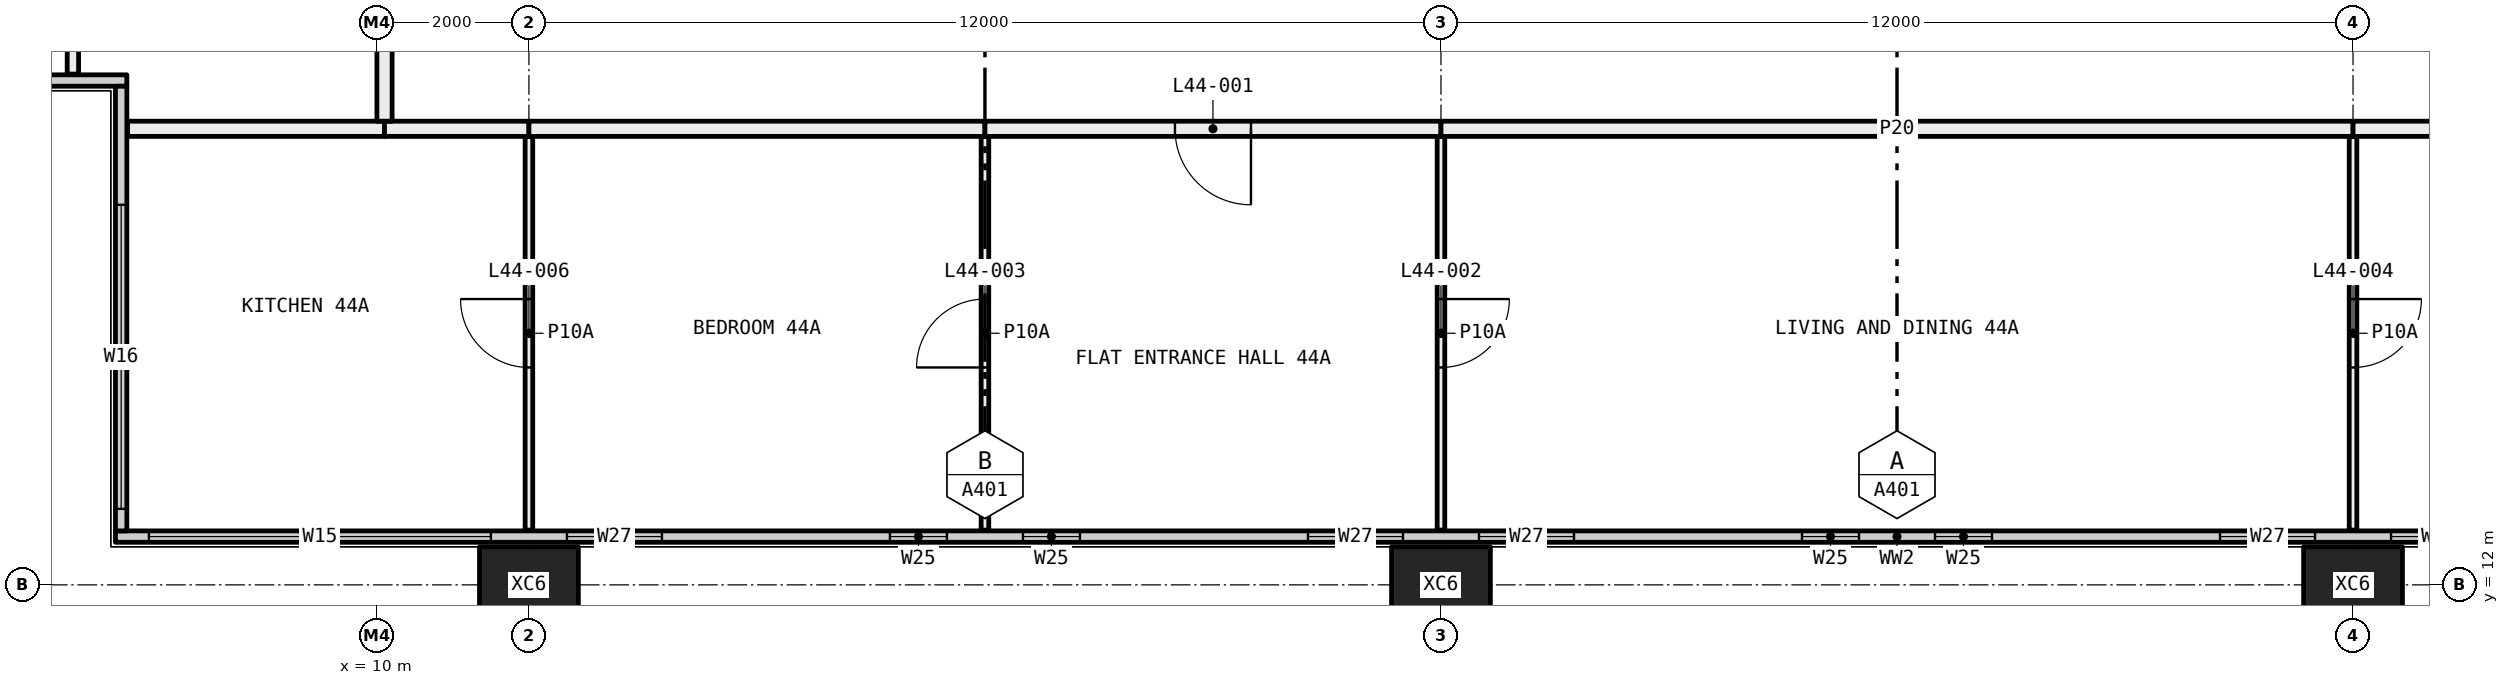
"""IFC4 building model, lengths in metres.
Left out: names, types, materials, properties, quantities, classifications, styles, units other than length and angle.
Written with IfcOpenShell. Run it as: python <this file> out.ifc"""

import sys

from ifc_helpers import new_model, si_unit, direction, frame, frame_2d, origin, origin_2d, place, context, subcontext, project, spatial, rectangle, hollow_rectangle, extrude, element, fill, save


model = new_model("IFC4")
c1 = context("Model", 3, precision=1e-05, world=origin(), true_north=direction((0.0, 1.0)))
c2 = subcontext(c1, "Body", "Model", "MODEL_VIEW")
j1 = project(units=[si_unit("LENGTHUNIT", "METRE"), si_unit("PLANEANGLEUNIT", "RADIAN")], contexts=[c1])
p1 = place(None, origin())
s1 = spatial("IfcSite", under=j1, at=p1, CompositionType="ELEMENT")
p2 = place(p1, origin())
s2 = spatial("IfcBuilding", under=s1, at=p2, CompositionType="ELEMENT")
p3 = place(p2, frame((0.0, 0.0, 168.6)))
s3 = spatial("IfcBuildingStorey", under=s2, at=p3, CompositionType="ELEMENT", Elevation=168.6)
for number, where, z_axis, x_axis in (
    (1, (12.0, 12.0, -0.4), (0.0, 0.0, 1.0), (1.0, 0.0, 0.0)),
    (2, (24.0, 12.0, -0.4), (0.0, 0.0, 1.0), (1.0, 0.0, 0.0)),
    (3, (36.0, 12.0, -0.4), (0.0, 0.0, 1.0), (1.0, 0.0, 0.0)),
):
    element("IfcColumn", number, at=place(p3, frame(where, z_axis=z_axis, x_axis=x_axis)), inside=s3, PredefinedType="COLUMN", context=c2, shape_type="SweptSolid", body=[
        extrude(hollow_rectangle(XDim=1.3, YDim=1.0, WallThickness=0.05, at=origin_2d()), origin(), (0.0, 0.0, 1.0), 3.45),
    ])
p4 = place(p3, frame((6.56, 12.635, 0.0), z_axis=(0.0, 0.0, 1.0), x_axis=(1.0, 0.0, 0.0)))
e4 = element("IfcWall", 4, at=p4, inside=s3, PredefinedType="ELEMENTEDWALL", context=c2, shape_type="SweptSolid", body=[
    extrude(rectangle(XDim=46.88, YDim=0.15, at=frame_2d((23.44, 0.0))), origin(), (0.0, 0.0, 1.0), 3.05),
])
p5 = place(p4, frame((0.44, 0.0, 0.45)))
e5 = element("IfcOpeningElement", 5, at=p5, cuts=e4, PredefinedType="OPENING", context=c2, shape_type="SweptSolid", body=[
    extrude(rectangle(XDim=4.5, YDim=2.55, at=frame_2d((2.25, 1.275))), frame((0.0, 0.085, 0.0), z_axis=(0.0, -1.0, 0.0), x_axis=(1.0, 0.0, 0.0)), (0.0, 0.0, 1.0), 0.17),
])
p6 = place(p4, frame((5.94, 0.0, 0.45)))
e6 = element("IfcOpeningElement", 6, at=p6, cuts=e4, PredefinedType="OPENING", context=c2, shape_type="SweptSolid", body=[
    extrude(rectangle(XDim=1.25, YDim=2.55, at=frame_2d((0.625, 1.275))), frame((0.0, 0.085, 0.0), z_axis=(0.0, -1.0, 0.0), x_axis=(1.0, 0.0, 0.0)), (0.0, 0.0, 1.0), 0.17),
])
p7 = place(p4, frame((10.19, 0.0, 0.45)))
e7 = element("IfcOpeningElement", 7, at=p7, cuts=e4, PredefinedType="OPENING", context=c2, shape_type="SweptSolid", body=[
    extrude(rectangle(XDim=0.75, YDim=2.55, at=frame_2d((0.375, 1.275))), frame((0.0, 0.085, 0.0), z_axis=(0.0, -1.0, 0.0), x_axis=(1.0, 0.0, 0.0)), (0.0, 0.0, 1.0), 0.17),
])
p8 = place(p4, frame((11.94, 0.0, 0.45)))
e8 = element("IfcOpeningElement", 8, at=p8, cuts=e4, PredefinedType="OPENING", context=c2, shape_type="SweptSolid", body=[
    extrude(rectangle(XDim=0.75, YDim=2.55, at=frame_2d((0.375, 1.275))), frame((0.0, 0.085, 0.0), z_axis=(0.0, -1.0, 0.0), x_axis=(1.0, 0.0, 0.0)), (0.0, 0.0, 1.0), 0.17),
])
p9 = place(p4, frame((15.69, 0.0, 0.45)))
e9 = element("IfcOpeningElement", 9, at=p9, cuts=e4, PredefinedType="OPENING", context=c2, shape_type="SweptSolid", body=[
    extrude(rectangle(XDim=1.25, YDim=2.55, at=frame_2d((0.625, 1.275))), frame((0.0, 0.085, 0.0), z_axis=(0.0, -1.0, 0.0), x_axis=(1.0, 0.0, 0.0)), (0.0, 0.0, 1.0), 0.17),
])
p10 = place(p4, frame((17.94, 0.0, 0.45)))
e10 = element("IfcOpeningElement", 10, at=p10, cuts=e4, PredefinedType="OPENING", context=c2, shape_type="SweptSolid", body=[
    extrude(rectangle(XDim=1.25, YDim=2.55, at=frame_2d((0.625, 1.275))), frame((0.0, 0.085, 0.0), z_axis=(0.0, -1.0, 0.0), x_axis=(1.0, 0.0, 0.0)), (0.0, 0.0, 1.0), 0.17),
])
p11 = place(p4, frame((22.19, 0.0, 0.45)))
e11 = element("IfcOpeningElement", 11, at=p11, cuts=e4, PredefinedType="OPENING", context=c2, shape_type="SweptSolid", body=[
    extrude(rectangle(XDim=0.75, YDim=2.55, at=frame_2d((0.375, 1.275))), frame((0.0, 0.085, 0.0), z_axis=(0.0, -1.0, 0.0), x_axis=(1.0, 0.0, 0.0)), (0.0, 0.0, 1.0), 0.17),
])
p12 = place(p4, frame((23.94, 0.0, 0.45)))
e12 = element("IfcOpeningElement", 12, at=p12, cuts=e4, PredefinedType="OPENING", context=c2, shape_type="SweptSolid", body=[
    extrude(rectangle(XDim=0.75, YDim=2.55, at=frame_2d((0.375, 1.275))), frame((0.0, 0.085, 0.0), z_axis=(0.0, -1.0, 0.0), x_axis=(1.0, 0.0, 0.0)), (0.0, 0.0, 1.0), 0.17),
])
p13 = place(p4, frame((27.69, 0.0, 0.45)))
e13 = element("IfcOpeningElement", 13, at=p13, cuts=e4, PredefinedType="OPENING", context=c2, shape_type="SweptSolid", body=[
    extrude(rectangle(XDim=1.25, YDim=2.55, at=frame_2d((0.625, 1.275))), frame((0.0, 0.085, 0.0), z_axis=(0.0, -1.0, 0.0), x_axis=(1.0, 0.0, 0.0)), (0.0, 0.0, 1.0), 0.17),
])
p14 = place(p4, frame((29.94, 0.0, 0.45)))
e14 = element("IfcOpeningElement", 14, at=p14, cuts=e4, PredefinedType="OPENING", context=c2, shape_type="SweptSolid", body=[
    extrude(rectangle(XDim=1.25, YDim=2.55, at=frame_2d((0.625, 1.275))), frame((0.0, 0.085, 0.0), z_axis=(0.0, -1.0, 0.0), x_axis=(1.0, 0.0, 0.0)), (0.0, 0.0, 1.0), 0.17),
])
p15 = place(p4, frame((34.19, 0.0, 0.45)))
e15 = element("IfcOpeningElement", 15, at=p15, cuts=e4, PredefinedType="OPENING", context=c2, shape_type="SweptSolid", body=[
    extrude(rectangle(XDim=0.75, YDim=2.55, at=frame_2d((0.375, 1.275))), frame((0.0, 0.085, 0.0), z_axis=(0.0, -1.0, 0.0), x_axis=(1.0, 0.0, 0.0)), (0.0, 0.0, 1.0), 0.17),
])
p16 = place(p4, frame((35.94, 0.0, 0.45)))
e16 = element("IfcOpeningElement", 16, at=p16, cuts=e4, PredefinedType="OPENING", context=c2, shape_type="SweptSolid", body=[
    extrude(rectangle(XDim=0.75, YDim=2.55, at=frame_2d((0.375, 1.275))), frame((0.0, 0.085, 0.0), z_axis=(0.0, -1.0, 0.0), x_axis=(1.0, 0.0, 0.0)), (0.0, 0.0, 1.0), 0.17),
])
p17 = place(p4, frame((39.69, 0.0, 0.45)))
e17 = element("IfcOpeningElement", 17, at=p17, cuts=e4, PredefinedType="OPENING", context=c2, shape_type="SweptSolid", body=[
    extrude(rectangle(XDim=1.25, YDim=2.55, at=frame_2d((0.625, 1.275))), frame((0.0, 0.085, 0.0), z_axis=(0.0, -1.0, 0.0), x_axis=(1.0, 0.0, 0.0)), (0.0, 0.0, 1.0), 0.17),
])
p18 = place(p4, frame((41.94, 0.0, 0.45)))
e18 = element("IfcOpeningElement", 18, at=p18, cuts=e4, PredefinedType="OPENING", context=c2, shape_type="SweptSolid", body=[
    extrude(rectangle(XDim=4.5, YDim=2.55, at=frame_2d((2.25, 1.275))), frame((0.0, 0.085, 0.0), z_axis=(0.0, -1.0, 0.0), x_axis=(1.0, 0.0, 0.0)), (0.0, 0.0, 1.0), 0.17),
])
p19 = place(p3, frame((0.56, 18.635, 0.0), z_axis=(0.0, 0.0, 1.0), x_axis=(1.0, 0.0, 0.0)))
e19 = element("IfcWall", 19, at=p19, inside=s3, PredefinedType="ELEMENTEDWALL", context=c2, shape_type="SweptSolid", body=[
    extrude(rectangle(XDim=6.15, YDim=0.15, at=frame_2d((3.075, 0.0))), origin(), (0.0, 0.0, 1.0), 3.05),
])
p20 = place(p19, frame((0.44, 0.0, 0.45)))
e20 = element("IfcOpeningElement", 20, at=p20, cuts=e19, PredefinedType="OPENING", context=c2, shape_type="SweptSolid", body=[
    extrude(rectangle(XDim=4.0, YDim=2.55, at=frame_2d((2.0, 1.275))), frame((0.0, 0.085, 0.0), z_axis=(0.0, -1.0, 0.0), x_axis=(1.0, 0.0, 0.0)), (0.0, 0.0, 1.0), 0.17),
])
p21 = place(p3, frame((6.635, 12.71, 0.0), z_axis=(0.0, 0.0, 1.0), x_axis=(0.0, 1.0, 0.0)))
e21 = element("IfcWall", 21, at=p21, inside=s3, PredefinedType="ELEMENTEDWALL", context=c2, shape_type="SweptSolid", body=[
    extrude(rectangle(XDim=5.85, YDim=0.15, at=frame_2d((2.925, 0.0))), origin(), (0.0, 0.0, 1.0), 3.05),
])
p22 = place(p21, frame((0.29, 0.0, 0.45)))
e22 = element("IfcOpeningElement", 22, at=p22, cuts=e21, PredefinedType="OPENING", context=c2, shape_type="SweptSolid", body=[
    extrude(rectangle(XDim=4.0, YDim=2.55, at=frame_2d((2.0, 1.275))), frame((0.0, 0.085, 0.0), z_axis=(0.0, -1.0, 0.0), x_axis=(1.0, 0.0, 0.0)), (0.0, 0.0, 1.0), 0.17),
])
p23 = place(p3, frame((12.0, 12.72, 0.0), z_axis=(0.0, 0.0, 1.0), x_axis=(0.0, 1.0, 0.0)))
e23 = element("IfcWall", 23, at=p23, inside=s3, PredefinedType="PARTITIONING", context=c2, shape_type="SweptSolid", body=[
    extrude(rectangle(XDim=5.18, YDim=0.1, at=frame_2d((2.59, 0.0))), origin(), (0.0, 0.0, 1.0), 3.05),
])
p24 = place(p23, frame((2.14, 0.0, 0.0)))
e24 = element("IfcOpeningElement", 24, at=p24, cuts=e23, PredefinedType="OPENING", context=c2, shape_type="SweptSolid", body=[
    extrude(rectangle(XDim=0.9, YDim=2.1, at=frame_2d((0.45, 1.05))), frame((0.0, 0.06, 0.0), z_axis=(0.0, -1.0, 0.0), x_axis=(1.0, 0.0, 0.0)), (0.0, 0.0, 1.0), 0.12),
])
p25 = place(p3, frame((10.1, 18.0, 0.0), z_axis=(0.0, 0.0, 1.0), x_axis=(-1.0, 0.0, 0.0)))
e25 = element("IfcWall", 25, at=p25, inside=s3, PredefinedType="PARTITIONING", context=c2, shape_type="SweptSolid", body=[
    extrude(rectangle(XDim=3.38, YDim=0.2, at=frame_2d((1.69, 0.0))), origin(), (0.0, 0.0, 1.0), 3.05),
])
p26 = place(p3, frame((12.0, 18.0, 0.0), z_axis=(0.0, 0.0, 1.0), x_axis=(-1.0, 0.0, 0.0)))
e26 = element("IfcWall", 26, at=p26, inside=s3, PredefinedType="PARTITIONING", context=c2, shape_type="SweptSolid", body=[
    extrude(rectangle(XDim=1.9, YDim=0.2, at=frame_2d((0.95, 0.0))), origin(), (0.0, 0.0, 1.0), 3.05),
])
p27 = place(p3, frame((18.0, 12.72, 0.0), z_axis=(0.0, 0.0, 1.0), x_axis=(0.0, 1.0, 0.0)))
e27 = element("IfcWall", 27, at=p27, inside=s3, PredefinedType="PARTITIONING", context=c2, shape_type="SweptSolid", body=[
    extrude(rectangle(XDim=5.18, YDim=0.1, at=frame_2d((2.59, 0.0))), origin(), (0.0, 0.0, 1.0), 3.05),
])
p28 = place(p27, frame((2.14, 0.0, 0.0)))
e28 = element("IfcOpeningElement", 28, at=p28, cuts=e27, PredefinedType="OPENING", context=c2, shape_type="SweptSolid", body=[
    extrude(rectangle(XDim=0.9, YDim=2.1, at=frame_2d((0.45, 1.05))), frame((0.0, 0.06, 0.0), z_axis=(0.0, -1.0, 0.0), x_axis=(1.0, 0.0, 0.0)), (0.0, 0.0, 1.0), 0.12),
])
p29 = place(p3, frame((18.0, 18.0, 0.0), z_axis=(0.0, 0.0, 1.0), x_axis=(-1.0, 0.0, 0.0)))
e29 = element("IfcWall", 29, at=p29, inside=s3, PredefinedType="PARTITIONING", context=c2, shape_type="SweptSolid", body=[
    extrude(rectangle(XDim=6.0, YDim=0.2, at=frame_2d((3.0, 0.0))), origin(), (0.0, 0.0, 1.0), 3.05),
])
p30 = place(p3, frame((24.0, 12.72, 0.0), z_axis=(0.0, 0.0, 1.0), x_axis=(0.0, 1.0, 0.0)))
e30 = element("IfcWall", 30, at=p30, inside=s3, PredefinedType="PARTITIONING", context=c2, shape_type="SweptSolid", body=[
    extrude(rectangle(XDim=5.18, YDim=0.1, at=frame_2d((2.59, 0.0))), origin(), (0.0, 0.0, 1.0), 3.05),
])
p31 = place(p30, frame((2.14, 0.0, 0.0)))
e31 = element("IfcOpeningElement", 31, at=p31, cuts=e30, PredefinedType="OPENING", context=c2, shape_type="SweptSolid", body=[
    extrude(rectangle(XDim=0.9, YDim=2.1, at=frame_2d((0.45, 1.05))), frame((0.0, 0.06, 0.0), z_axis=(0.0, -1.0, 0.0), x_axis=(1.0, 0.0, 0.0)), (0.0, 0.0, 1.0), 0.12),
])
p32 = place(p3, frame((24.0, 18.0, 0.0), z_axis=(0.0, 0.0, 1.0), x_axis=(-1.0, 0.0, 0.0)))
e32 = element("IfcWall", 32, at=p32, inside=s3, PredefinedType="PARTITIONING", context=c2, shape_type="SweptSolid", body=[
    extrude(rectangle(XDim=6.0, YDim=0.2, at=frame_2d((3.0, 0.0))), origin(), (0.0, 0.0, 1.0), 3.05),
])
p33 = place(p32, frame((2.5, 0.0, 0.0)))
e33 = element("IfcOpeningElement", 33, at=p33, cuts=e32, PredefinedType="OPENING", context=c2, shape_type="SweptSolid", body=[
    extrude(rectangle(XDim=1.0, YDim=2.1, at=frame_2d((0.5, 1.05))), frame((0.0, 0.11, 0.0), z_axis=(0.0, -1.0, 0.0), x_axis=(1.0, 0.0, 0.0)), (0.0, 0.0, 1.0), 0.22),
])
p34 = place(p3, frame((36.0, 12.72, 0.0), z_axis=(0.0, 0.0, 1.0), x_axis=(0.0, 1.0, 0.0)))
e34 = element("IfcWall", 34, at=p34, inside=s3, PredefinedType="PARTITIONING", context=c2, shape_type="SweptSolid", body=[
    extrude(rectangle(XDim=5.18, YDim=0.1, at=frame_2d((2.59, 0.0))), origin(), (0.0, 0.0, 1.0), 2.45),
])
p35 = place(p34, frame((2.14, 0.0, 0.0)))
e35 = element("IfcOpeningElement", 35, at=p35, cuts=e34, PredefinedType="OPENING", context=c2, shape_type="SweptSolid", body=[
    extrude(rectangle(XDim=0.9, YDim=2.1, at=frame_2d((0.45, 1.05))), frame((0.0, 0.06, 0.0), z_axis=(0.0, -1.0, 0.0), x_axis=(1.0, 0.0, 0.0)), (0.0, 0.0, 1.0), 0.12),
])
p36 = place(p3, frame((36.0, 18.0, 0.0), z_axis=(0.0, 0.0, 1.0), x_axis=(-1.0, 0.0, 0.0)))
e36 = element("IfcWall", 36, at=p36, inside=s3, PredefinedType="PARTITIONING", context=c2, shape_type="SweptSolid", body=[
    extrude(rectangle(XDim=12.0, YDim=0.2, at=frame_2d((6.0, 0.0))), origin(), (0.0, 0.0, 1.0), 2.45),
])
p37 = place(p3, frame((42.0, 18.0, 0.0), z_axis=(0.0, 0.0, 1.0), x_axis=(-1.0, 0.0, 0.0)))
e37 = element("IfcWall", 37, at=p37, inside=s3, PredefinedType="PARTITIONING", context=c2, shape_type="SweptSolid", body=[
    extrude(rectangle(XDim=6.0, YDim=0.2, at=frame_2d((3.0, 0.0))), origin(), (0.0, 0.0, 1.0), 2.45),
])
p38 = place(p3, frame((6.0, 18.72, 0.0), z_axis=(0.0, 0.0, 1.0), x_axis=(0.0, 1.0, 0.0)))
e38 = element("IfcWall", 38, at=p38, inside=s3, PredefinedType="PARTITIONING", context=c2, shape_type="SweptSolid", body=[
    extrude(rectangle(XDim=3.78, YDim=0.15, at=frame_2d((1.89, 0.0))), origin(), (0.0, 0.0, 1.0), 3.05),
])
p39 = place(p3, frame((10.1, 18.1, 0.0), z_axis=(0.0, 0.0, 1.0), x_axis=(0.0, 1.0, 0.0)))
e39 = element("IfcWall", 39, at=p39, inside=s3, PredefinedType="PARTITIONING", context=c2, shape_type="SweptSolid", body=[
    extrude(rectangle(XDim=4.4, YDim=0.2, at=frame_2d((2.2, 0.0))), origin(), (0.0, 0.0, 1.0), 3.05),
])
p40 = place(p5, origin())
e40 = element("IfcWindow", 40, at=p40, inside=s3, PartitioningType="SINGLE_PANEL", PredefinedType="WINDOW", context=c2, shape_type="SweptSolid", body=[
    extrude(rectangle(XDim=4.5, YDim=2.55, at=frame_2d((2.25, 1.275))), frame((0.0, 0.03, 0.0), z_axis=(0.0, -1.0, 0.0), x_axis=(1.0, 0.0, 0.0)), (0.0, 0.0, 1.0), 0.06),
])
fill(e5, e40)
p41 = place(p6, origin())
e41 = element("IfcWindow", 41, at=p41, inside=s3, PartitioningType="SINGLE_PANEL", PredefinedType="WINDOW", context=c2, shape_type="SweptSolid", body=[
    extrude(rectangle(XDim=1.25, YDim=2.55, at=frame_2d((0.625, 1.275))), frame((0.0, 0.03, 0.0), z_axis=(0.0, -1.0, 0.0), x_axis=(1.0, 0.0, 0.0)), (0.0, 0.0, 1.0), 0.06),
])
fill(e6, e41)
p42 = place(p7, origin())
e42 = element("IfcWindow", 42, at=p42, inside=s3, PartitioningType="SINGLE_PANEL", PredefinedType="WINDOW", context=c2, shape_type="SweptSolid", body=[
    extrude(rectangle(XDim=0.75, YDim=2.55, at=frame_2d((0.375, 1.275))), frame((0.0, 0.03, 0.0), z_axis=(0.0, -1.0, 0.0), x_axis=(1.0, 0.0, 0.0)), (0.0, 0.0, 1.0), 0.06),
])
fill(e7, e42)
p43 = place(p8, origin())
e43 = element("IfcWindow", 43, at=p43, inside=s3, PartitioningType="SINGLE_PANEL", PredefinedType="WINDOW", context=c2, shape_type="SweptSolid", body=[
    extrude(rectangle(XDim=0.75, YDim=2.55, at=frame_2d((0.375, 1.275))), frame((0.0, 0.03, 0.0), z_axis=(0.0, -1.0, 0.0), x_axis=(1.0, 0.0, 0.0)), (0.0, 0.0, 1.0), 0.06),
])
fill(e8, e43)
p44 = place(p9, origin())
e44 = element("IfcWindow", 44, at=p44, inside=s3, PartitioningType="SINGLE_PANEL", PredefinedType="WINDOW", context=c2, shape_type="SweptSolid", body=[
    extrude(rectangle(XDim=1.25, YDim=2.55, at=frame_2d((0.625, 1.275))), frame((0.0, 0.03, 0.0), z_axis=(0.0, -1.0, 0.0), x_axis=(1.0, 0.0, 0.0)), (0.0, 0.0, 1.0), 0.06),
])
fill(e9, e44)
p45 = place(p10, origin())
e45 = element("IfcWindow", 45, at=p45, inside=s3, PartitioningType="SINGLE_PANEL", PredefinedType="WINDOW", context=c2, shape_type="SweptSolid", body=[
    extrude(rectangle(XDim=1.25, YDim=2.55, at=frame_2d((0.625, 1.275))), frame((0.0, 0.03, 0.0), z_axis=(0.0, -1.0, 0.0), x_axis=(1.0, 0.0, 0.0)), (0.0, 0.0, 1.0), 0.06),
])
fill(e10, e45)
p46 = place(p11, origin())
e46 = element("IfcWindow", 46, at=p46, inside=s3, PartitioningType="SINGLE_PANEL", PredefinedType="WINDOW", context=c2, shape_type="SweptSolid", body=[
    extrude(rectangle(XDim=0.75, YDim=2.55, at=frame_2d((0.375, 1.275))), frame((0.0, 0.03, 0.0), z_axis=(0.0, -1.0, 0.0), x_axis=(1.0, 0.0, 0.0)), (0.0, 0.0, 1.0), 0.06),
])
fill(e11, e46)
p47 = place(p12, origin())
e47 = element("IfcWindow", 47, at=p47, inside=s3, PartitioningType="SINGLE_PANEL", PredefinedType="WINDOW", context=c2, shape_type="SweptSolid", body=[
    extrude(rectangle(XDim=0.75, YDim=2.55, at=frame_2d((0.375, 1.275))), frame((0.0, 0.03, 0.0), z_axis=(0.0, -1.0, 0.0), x_axis=(1.0, 0.0, 0.0)), (0.0, 0.0, 1.0), 0.06),
])
fill(e12, e47)
p48 = place(p13, origin())
e48 = element("IfcWindow", 48, at=p48, inside=s3, PartitioningType="SINGLE_PANEL", PredefinedType="WINDOW", context=c2, shape_type="SweptSolid", body=[
    extrude(rectangle(XDim=1.25, YDim=2.55, at=frame_2d((0.625, 1.275))), frame((0.0, 0.03, 0.0), z_axis=(0.0, -1.0, 0.0), x_axis=(1.0, 0.0, 0.0)), (0.0, 0.0, 1.0), 0.06),
])
fill(e13, e48)
p49 = place(p14, origin())
e49 = element("IfcWindow", 49, at=p49, inside=s3, PartitioningType="SINGLE_PANEL", PredefinedType="WINDOW", context=c2, shape_type="SweptSolid", body=[
    extrude(rectangle(XDim=1.25, YDim=2.55, at=frame_2d((0.625, 1.275))), frame((0.0, 0.03, 0.0), z_axis=(0.0, -1.0, 0.0), x_axis=(1.0, 0.0, 0.0)), (0.0, 0.0, 1.0), 0.06),
])
fill(e14, e49)
p50 = place(p22, origin())
e50 = element("IfcWindow", 50, at=p50, inside=s3, PartitioningType="SINGLE_PANEL", PredefinedType="WINDOW", context=c2, shape_type="SweptSolid", body=[
    extrude(rectangle(XDim=4.0, YDim=2.55, at=frame_2d((2.0, 1.275))), frame((0.0, 0.03, 0.0), z_axis=(0.0, -1.0, 0.0), x_axis=(1.0, 0.0, 0.0)), (0.0, 0.0, 1.0), 0.06),
])
fill(e22, e50)
p51 = place(p33, origin())
e51 = element("IfcDoor", 51, at=p51, inside=s3, OperationType="SINGLE_SWING_RIGHT", PredefinedType="DOOR", context=c2, shape_type="SweptSolid", body=[
    extrude(rectangle(XDim=1.0, YDim=2.1, at=frame_2d((0.5, 1.05))), frame((0.0, 0.025, 0.0), z_axis=(0.0, -1.0, 0.0), x_axis=(1.0, 0.0, 0.0)), (0.0, 0.0, 1.0), 0.05),
])
fill(e33, e51)
p52 = place(p31, frame((0.9, 0.0, 0.0), x_axis=(-1.0, 0.0, 0.0)))
e52 = element("IfcDoor", 52, at=p52, inside=s3, OperationType="SINGLE_SWING_RIGHT", PredefinedType="DOOR", context=c2, shape_type="SweptSolid", body=[
    extrude(rectangle(XDim=0.9, YDim=2.1, at=frame_2d((0.45, 1.05))), frame((0.0, 0.025, 0.0), z_axis=(0.0, -1.0, 0.0), x_axis=(1.0, 0.0, 0.0)), (0.0, 0.0, 1.0), 0.05),
])
fill(e31, e52)
p53 = place(p28, origin())
e53 = element("IfcDoor", 53, at=p53, inside=s3, OperationType="SINGLE_SWING_RIGHT", PredefinedType="DOOR", context=c2, shape_type="SweptSolid", body=[
    extrude(rectangle(XDim=0.9, YDim=2.1, at=frame_2d((0.45, 1.05))), frame((0.0, 0.025, 0.0), z_axis=(0.0, -1.0, 0.0), x_axis=(1.0, 0.0, 0.0)), (0.0, 0.0, 1.0), 0.05),
])
fill(e28, e53)
p54 = place(p35, frame((0.9, 0.0, 0.0), x_axis=(-1.0, 0.0, 0.0)))
e54 = element("IfcDoor", 54, at=p54, inside=s3, OperationType="SINGLE_SWING_RIGHT", PredefinedType="DOOR", context=c2, shape_type="SweptSolid", body=[
    extrude(rectangle(XDim=0.9, YDim=2.1, at=frame_2d((0.45, 1.05))), frame((0.0, 0.025, 0.0), z_axis=(0.0, -1.0, 0.0), x_axis=(1.0, 0.0, 0.0)), (0.0, 0.0, 1.0), 0.05),
])
fill(e35, e54)
p55 = place(p24, origin())
e55 = element("IfcDoor", 55, at=p55, inside=s3, OperationType="SINGLE_SWING_LEFT", PredefinedType="DOOR", context=c2, shape_type="SweptSolid", body=[
    extrude(rectangle(XDim=0.9, YDim=2.1, at=frame_2d((0.45, 1.05))), frame((0.0, 0.025, 0.0), z_axis=(0.0, -1.0, 0.0), x_axis=(1.0, 0.0, 0.0)), (0.0, 0.0, 1.0), 0.05),
])
fill(e24, e55)
save(model, sys.argv[1])
